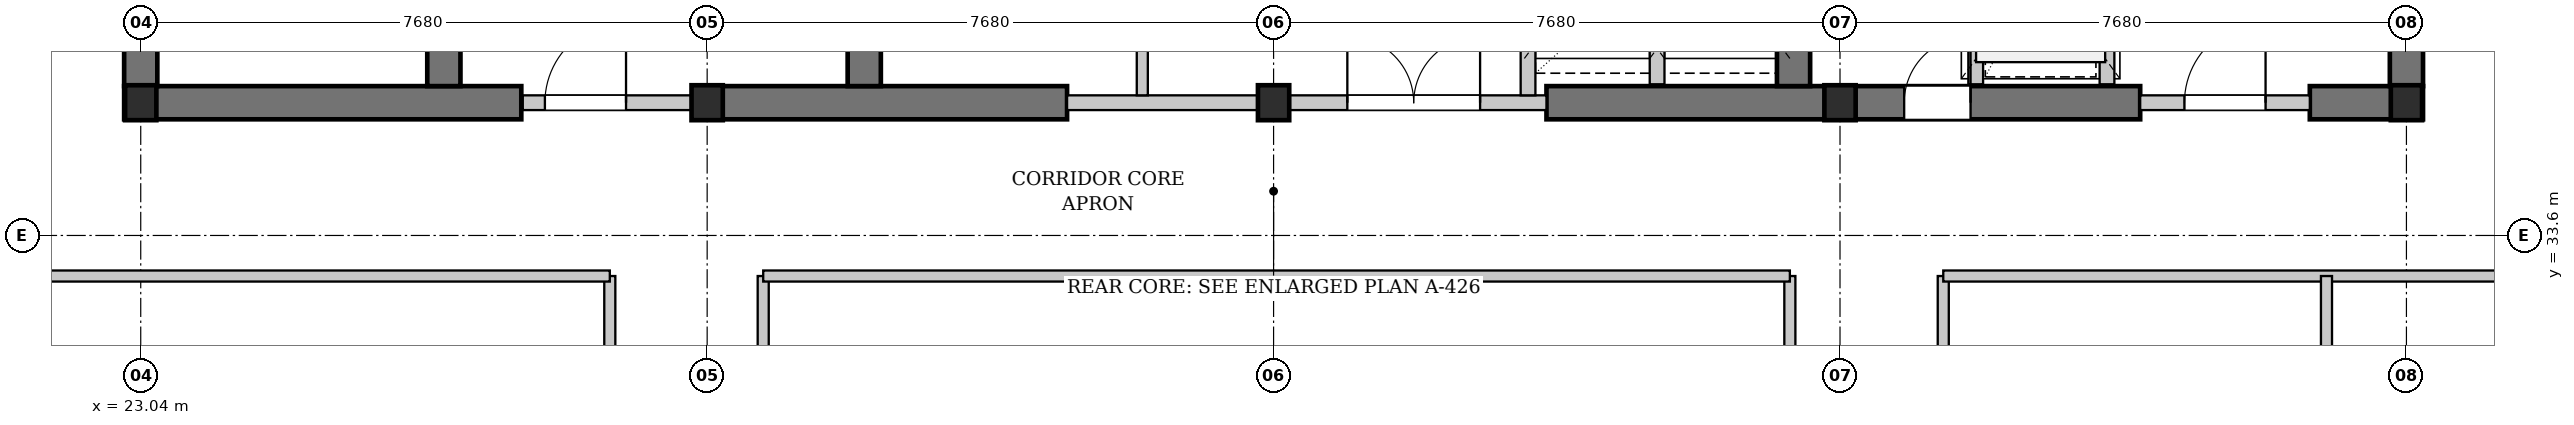
"""IFC4 building model, lengths in metres.
Left out: names, types, materials, properties, quantities, classifications, styles, units other than length and angle.
Written with IfcOpenShell. Run it as: python <this file> out.ifc"""

import sys

from ifc_helpers import new_model, si_unit, direction, frame, frame_2d, origin, origin_2d, place, context, subcontext, project, spatial, rectangle, i_section, extrude, element, fill, save


model = new_model("IFC4")
c1 = context("Model", 3, precision=1e-05, world=origin(), true_north=direction((0.0, 1.0)))
c2 = subcontext(c1, "Body", "Model", "MODEL_VIEW")
j1 = project(units=[si_unit("LENGTHUNIT", "METRE"), si_unit("PLANEANGLEUNIT", "RADIAN")], contexts=[c1])
p1 = place(None, origin())
s1 = spatial("IfcSite", under=j1, at=p1, CompositionType="ELEMENT")
p2 = place(p1, origin())
s2 = spatial("IfcBuilding", under=s1, at=p2, CompositionType="ELEMENT")
p3 = place(p2, frame((0.0, 0.0, 96.5)))
s3 = spatial("IfcBuildingStorey", under=s2, at=p3, CompositionType="ELEMENT", Elevation=96.5)
p4 = place(p3, frame((22.815, 35.4, 0.0), z_axis=(0.0, 0.0, 1.0), x_axis=(1.0, 0.0, 0.0)))
e1 = element("IfcWall", 1, at=p4, inside=s3, PredefinedType="SHEAR", context=c2, shape_type="SweptSolid", body=[
    extrude(rectangle(XDim=5.385, YDim=0.45, at=frame_2d((2.692, 0.0))), origin(), (0.0, 0.0, 1.0), 3.18),
])
p5 = place(p3, frame((30.72, 35.4, 0.0), z_axis=(0.0, 0.0, 1.0), x_axis=(1.0, 0.0, 0.0)))
e2 = element("IfcWall", 2, at=p5, inside=s3, PredefinedType="SHEAR", context=c2, shape_type="SweptSolid", body=[
    extrude(rectangle(XDim=4.88, YDim=0.45, at=frame_2d((2.44, 0.0))), origin(), (0.0, 0.0, 1.0), 3.18),
])
p6 = place(p3, frame((42.1, 35.4, 0.0), z_axis=(0.0, 0.0, 1.0), x_axis=(1.0, 0.0, 0.0)))
e3 = element("IfcWall", 3, at=p6, inside=s3, PredefinedType="SHEAR", context=c2, shape_type="SweptSolid", body=[
    extrude(rectangle(XDim=8.05, YDim=0.45, at=frame_2d((4.025, 0.0))), origin(), (0.0, 0.0, 1.0), 3.18),
])
p7 = place(p6, frame((4.85, 0.0, 0.0)))
e4 = element("IfcOpeningElement", 4, at=p7, cuts=e3, PredefinedType="OPENING", context=c2, shape_type="SweptSolid", body=[
    extrude(rectangle(XDim=0.9, YDim=2.15, at=frame_2d((0.45, 1.075))), frame((0.0, 0.235, 0.0), z_axis=(0.0, -1.0, 0.0), x_axis=(1.0, 0.0, 0.0)), (0.0, 0.0, 1.0), 0.47),
])
p8 = place(p3, frame((52.45, 35.4, 0.0), z_axis=(0.0, 0.0, 1.0), x_axis=(1.0, 0.0, 0.0)))
e5 = element("IfcWall", 5, at=p8, inside=s3, PredefinedType="SHEAR", context=c2, shape_type="SweptSolid", body=[
    extrude(rectangle(XDim=1.535, YDim=0.45, at=frame_2d((0.768, 0.0))), origin(), (0.0, 0.0, 1.0), 3.18),
])
p9 = place(p3, frame((23.04, 35.625, 0.0), z_axis=(0.0, 0.0, 1.0), x_axis=(0.0, 1.0, 0.0)))
e6 = element("IfcWall", 6, at=p9, inside=s3, PredefinedType="SHEAR", context=c2, shape_type="SweptSolid", body=[
    extrude(rectangle(XDim=10.35, YDim=0.45, at=frame_2d((5.175, 0.0))), origin(), (0.0, 0.0, 1.0), 3.18),
])
p10 = place(p3, frame((27.15, 35.625, 0.0), z_axis=(0.0, 0.0, 1.0), x_axis=(0.0, 1.0, 0.0)))
e7 = element("IfcWall", 7, at=p10, inside=s3, PredefinedType="SHEAR", context=c2, shape_type="SweptSolid", body=[
    extrude(rectangle(XDim=10.35, YDim=0.45, at=frame_2d((5.175, 0.0))), origin(), (0.0, 0.0, 1.0), 3.18),
])
p11 = place(p10, frame((0.675, 0.0, 0.0)))
e8 = element("IfcOpeningElement", 8, at=p11, cuts=e7, PredefinedType="OPENING", context=c2, shape_type="SweptSolid", body=[
    extrude(rectangle(XDim=1.1, YDim=2.15, at=frame_2d((0.55, 1.075))), frame((0.0, 0.235, 0.0), z_axis=(0.0, -1.0, 0.0), x_axis=(1.0, 0.0, 0.0)), (0.0, 0.0, 1.0), 0.47),
])
for number, where, z_axis, x_axis in (
    (9, (32.85, 35.625, 0.0), (0.0, 0.0, 1.0), (0.0, 1.0, 0.0)),
    (10, (45.45, 35.625, 0.0), (0.0, 0.0, 1.0), (0.0, 1.0, 0.0)),
    (11, (53.76, 35.625, 0.0), (0.0, 0.0, 1.0), (0.0, 1.0, 0.0)),
):
    element("IfcWall", number, at=place(p3, frame(where, z_axis=z_axis, x_axis=x_axis)), inside=s3, PredefinedType="SHEAR", context=c2, shape_type="SweptSolid", body=[
        extrude(rectangle(XDim=10.35, YDim=0.45, at=frame_2d((5.175, 0.0))), origin(), (0.0, 0.0, 1.0), 3.18),
    ])
for number, where, z_axis, x_axis in (
    (12, (23.04, 35.4, 0.0), (0.0, 0.0, 1.0), (1.0, 0.0, 0.0)),
    (13, (30.72, 35.4, 0.0), (0.0, 0.0, 1.0), (1.0, 0.0, 0.0)),
    (14, (38.4, 35.4, 0.0), (0.0, 0.0, 1.0), (1.0, 0.0, 0.0)),
    (15, (46.08, 35.4, 0.0), (0.0, 0.0, 1.0), (1.0, 0.0, 0.0)),
    (16, (53.76, 35.4, 0.0), (0.0, 0.0, 1.0), (1.0, 0.0, 0.0)),
):
    element("IfcColumn", number, at=place(p3, frame(where, z_axis=z_axis, x_axis=x_axis)), inside=s3, PredefinedType="COLUMN", context=c2, shape_type="SweptSolid", body=[
        extrude(i_section(OverallWidth=0.424, OverallDepth=0.474, WebThickness=0.047, FlangeThickness=0.077, FilletRadius=0.015, at=origin_2d()), origin(), (0.0, 0.0, 1.0), 3.4),
    ])
p12 = place(p3, frame((28.22, 35.4, 0.0), z_axis=(0.0, 0.0, 1.0), x_axis=(1.0, 0.0, 0.0)))
e17 = element("IfcWall", 17, at=p12, inside=s3, PredefinedType="PARTITIONING", context=c2, shape_type="SweptSolid", body=[
    extrude(rectangle(XDim=2.5, YDim=0.2, at=frame_2d((1.25, 0.0))), origin(), (0.0, 0.0, 1.0), 2.525),
])
p13 = place(p12, frame((0.3, 0.0, 0.0)))
e18 = element("IfcOpeningElement", 18, at=p13, cuts=e17, PredefinedType="OPENING", context=c2, shape_type="SweptSolid", body=[
    extrude(rectangle(XDim=1.1, YDim=2.15, at=frame_2d((0.55, 1.075))), frame((0.0, 0.11, 0.0), z_axis=(0.0, -1.0, 0.0), x_axis=(1.0, 0.0, 0.0)), (0.0, 0.0, 1.0), 0.22),
])
p14 = place(p3, frame((35.6, 35.4, 0.0), z_axis=(0.0, 0.0, 1.0), x_axis=(1.0, 0.0, 0.0)))
e19 = element("IfcWall", 19, at=p14, inside=s3, PredefinedType="PARTITIONING", context=c2, shape_type="SweptSolid", body=[
    extrude(rectangle(XDim=6.5, YDim=0.2, at=frame_2d((3.25, 0.0))), origin(), (0.0, 0.0, 1.0), 2.525),
])
p15 = place(p14, frame((3.8, 0.0, 0.0)))
e20 = element("IfcOpeningElement", 20, at=p15, cuts=e19, PredefinedType="OPENING", context=c2, shape_type="SweptSolid", body=[
    extrude(rectangle(XDim=1.8, YDim=2.3, at=frame_2d((0.9, 1.15))), frame((0.0, 0.11, 0.0), z_axis=(0.0, -1.0, 0.0), x_axis=(1.0, 0.0, 0.0)), (0.0, 0.0, 1.0), 0.22),
])
p16 = place(p3, frame((36.62, 35.5, 0.0), z_axis=(0.0, 0.0, 1.0), x_axis=(0.0, 1.0, 0.0)))
e21 = element("IfcWall", 21, at=p16, inside=s3, PredefinedType="PARTITIONING", context=c2, shape_type="SweptSolid", body=[
    extrude(rectangle(XDim=10.42, YDim=0.15, at=frame_2d((5.21, 0.0))), origin(), (0.0, 0.0, 1.0), 3.18),
])
p17 = place(p16, frame((3.92, 0.0, 0.0)))
e22 = element("IfcOpeningElement", 22, at=p17, cuts=e21, PredefinedType="OPENING", context=c2, shape_type="SweptSolid", body=[
    extrude(rectangle(XDim=0.9, YDim=2.15, at=frame_2d((0.45, 1.075))), frame((0.0, 0.085, 0.0), z_axis=(0.0, -1.0, 0.0), x_axis=(1.0, 0.0, 0.0)), (0.0, 0.0, 1.0), 0.17),
])
p18 = place(p16, frame((5.85, 0.0, 0.0)))
e23 = element("IfcOpeningElement", 23, at=p18, cuts=e21, PredefinedType="OPENING", context=c2, shape_type="SweptSolid", body=[
    extrude(rectangle(XDim=0.9, YDim=2.15, at=frame_2d((0.45, 1.075))), frame((0.0, 0.085, 0.0), z_axis=(0.0, -1.0, 0.0), x_axis=(1.0, 0.0, 0.0)), (0.0, 0.0, 1.0), 0.17),
])
p19 = place(p3, frame((43.6, 35.65, 0.0), z_axis=(0.0, 0.0, 1.0), x_axis=(0.0, 1.0, 0.0)))
e24 = element("IfcWall", 24, at=p19, inside=s3, PredefinedType="PARTITIONING", context=c2, shape_type="SweptSolid", body=[
    extrude(rectangle(XDim=3.25, YDim=0.2, at=frame_2d((1.625, 0.0))), origin(), (0.0, 0.0, 1.0), 3.18),
])
p20 = place(p3, frame((41.85, 35.5, 0.0), z_axis=(0.0, 0.0, 1.0), x_axis=(0.0, 1.0, 0.0)))
e25 = element("IfcWall", 25, at=p20, inside=s3, PredefinedType="PARTITIONING", context=c2, shape_type="SweptSolid", body=[
    extrude(rectangle(XDim=3.4, YDim=0.2, at=frame_2d((1.7, 0.0))), origin(), (0.0, 0.0, 1.0), 3.18),
])
p21 = place(p3, frame((50.15, 35.4, 0.0), z_axis=(0.0, 0.0, 1.0), x_axis=(1.0, 0.0, 0.0)))
e26 = element("IfcWall", 26, at=p21, inside=s3, PredefinedType="PARTITIONING", context=c2, shape_type="SweptSolid", body=[
    extrude(rectangle(XDim=2.3, YDim=0.2, at=frame_2d((1.15, 0.0))), origin(), (0.0, 0.0, 1.0), 2.525),
])
p22 = place(p21, frame((0.6, 0.0, 0.0)))
e27 = element("IfcOpeningElement", 27, at=p22, cuts=e26, PredefinedType="OPENING", context=c2, shape_type="SweptSolid", body=[
    extrude(rectangle(XDim=1.1, YDim=2.15, at=frame_2d((0.55, 1.075))), frame((0.0, 0.11, 0.0), z_axis=(0.0, -1.0, 0.0), x_axis=(1.0, 0.0, 0.0)), (0.0, 0.0, 1.0), 0.22),
])
p23 = place(p3, frame((49.7, 35.65, 0.0), z_axis=(0.0, 0.0, 1.0), x_axis=(0.0, 1.0, 0.0)))
e28 = element("IfcWall", 28, at=p23, inside=s3, PredefinedType="PARTITIONING", context=c2, shape_type="SweptSolid", body=[
    extrude(rectangle(XDim=3.15, YDim=0.2, at=frame_2d((1.575, 0.0))), origin(), (0.0, 0.0, 1.0), 3.18),
])
p24 = place(p23, frame((0.85, 0.0, 0.0)))
e29 = element("IfcOpeningElement", 29, at=p24, cuts=e28, PredefinedType="OPENING", context=c2, shape_type="SweptSolid", body=[
    extrude(rectangle(XDim=1.2, YDim=2.2, at=frame_2d((0.6, 1.1))), frame((0.0, 0.11, 0.0), z_axis=(0.0, -1.0, 0.0), x_axis=(1.0, 0.0, 0.0)), (0.0, 0.0, 1.0), 0.22),
])
p25 = place(p3, frame((47.92, 35.65, 0.0), z_axis=(0.0, 0.0, 1.0), x_axis=(0.0, 1.0, 0.0)))
e30 = element("IfcWall", 30, at=p25, inside=s3, PredefinedType="PARTITIONING", context=c2, shape_type="SweptSolid", body=[
    extrude(rectangle(XDim=3.15, YDim=0.2, at=frame_2d((1.575, 0.0))), origin(), (0.0, 0.0, 1.0), 3.18),
])
for number, where, z_axis, x_axis in (
    (31, (29.4, 24.38, 0.0), (0.0, 0.0, 1.0), (0.0, 1.0, 0.0)),
    (32, (31.48, 24.38, 0.0), (0.0, 0.0, 1.0), (0.0, 1.0, 0.0)),
    (33, (45.4, 24.38, 0.0), (0.0, 0.0, 1.0), (0.0, 1.0, 0.0)),
    (34, (47.48, 24.38, 0.0), (0.0, 0.0, 1.0), (0.0, 1.0, 0.0)),
):
    element("IfcWall", number, at=place(p3, frame(where, z_axis=z_axis, x_axis=x_axis)), inside=s3, PredefinedType="PARTITIONING", context=c2, shape_type="SweptSolid", body=[
        extrude(rectangle(XDim=8.67, YDim=0.15, at=frame_2d((4.335, 0.0))), origin(), (0.0, 0.0, 1.0), 3.18),
    ])
p26 = place(p3, frame((20.436, 33.05, 0.0), z_axis=(0.0, 0.0, 1.0), x_axis=(1.0, 0.0, 0.0)))
e35 = element("IfcWall", 35, at=p26, inside=s3, PredefinedType="PARTITIONING", context=c2, shape_type="SweptSolid", body=[
    extrude(rectangle(XDim=8.964, YDim=0.15, at=frame_2d((4.482, 0.0))), origin(), (0.0, 0.0, 1.0), 3.18),
])
p27 = place(p3, frame((31.48, 33.05, 0.0), z_axis=(0.0, 0.0, 1.0), x_axis=(1.0, 0.0, 0.0)))
e36 = element("IfcWall", 36, at=p27, inside=s3, PredefinedType="PARTITIONING", context=c2, shape_type="SweptSolid", body=[
    extrude(rectangle(XDim=13.92, YDim=0.15, at=frame_2d((6.96, 0.0))), origin(), (0.0, 0.0, 1.0), 3.18),
])
p28 = place(p3, frame((47.48, 33.05, 0.0), z_axis=(0.0, 0.0, 1.0), x_axis=(1.0, 0.0, 0.0)))
e37 = element("IfcWall", 37, at=p28, inside=s3, PredefinedType="PARTITIONING", context=c2, shape_type="SweptSolid", body=[
    extrude(rectangle(XDim=22.578, YDim=0.15, at=frame_2d((11.289, 0.0))), origin(), (0.0, 0.0, 1.0), 2.525),
])
p29 = place(p3, frame((52.676, 24.38, 0.0), z_axis=(0.0, 0.0, 1.0), x_axis=(0.0, 1.0, 0.0)))
e38 = element("IfcWall", 38, at=p29, inside=s3, PredefinedType="PARTITIONING", context=c2, shape_type="SweptSolid", body=[
    extrude(rectangle(XDim=8.67, YDim=0.15, at=frame_2d((4.335, 0.0))), origin(), (0.0, 0.0, 1.0), 3.18),
])
p30 = place(p13, origin())
e39 = element("IfcDoor", 39, at=p30, inside=s3, OperationType="SINGLE_SWING_RIGHT", PredefinedType="DOOR", context=c2, shape_type="SweptSolid", body=[
    extrude(rectangle(XDim=1.1, YDim=2.15, at=frame_2d((0.55, 1.075))), frame((0.0, 0.025, 0.0), z_axis=(0.0, -1.0, 0.0), x_axis=(1.0, 0.0, 0.0)), (0.0, 0.0, 1.0), 0.05),
])
fill(e18, e39)
p31 = place(p15, origin())
e40 = element("IfcDoor", 40, at=p31, inside=s3, OperationType="DOUBLE_DOOR_SINGLE_SWING", PredefinedType="DOOR", context=c2, shape_type="SweptSolid", body=[
    extrude(rectangle(XDim=1.8, YDim=2.3, at=frame_2d((0.9, 1.15))), frame((0.0, 0.025, 0.0), z_axis=(0.0, -1.0, 0.0), x_axis=(1.0, 0.0, 0.0)), (0.0, 0.0, 1.0), 0.05),
])
fill(e20, e40)
p32 = place(p22, origin())
e41 = element("IfcDoor", 41, at=p32, inside=s3, OperationType="SINGLE_SWING_RIGHT", PredefinedType="DOOR", context=c2, shape_type="SweptSolid", body=[
    extrude(rectangle(XDim=1.1, YDim=2.15, at=frame_2d((0.55, 1.075))), frame((0.0, 0.025, 0.0), z_axis=(0.0, -1.0, 0.0), x_axis=(1.0, 0.0, 0.0)), (0.0, 0.0, 1.0), 0.05),
])
fill(e27, e41)
p33 = place(p7, origin())
e42 = element("IfcDoor", 42, at=p33, inside=s3, OperationType="SINGLE_SWING_RIGHT", PredefinedType="DOOR", context=c2, shape_type="SweptSolid", body=[
    extrude(rectangle(XDim=0.9, YDim=2.15, at=frame_2d((0.45, 1.075))), frame((0.0, 0.025, 0.0), z_axis=(0.0, -1.0, 0.0), x_axis=(1.0, 0.0, 0.0)), (0.0, 0.0, 1.0), 0.05),
])
fill(e4, e42)
save(model, sys.argv[1])
